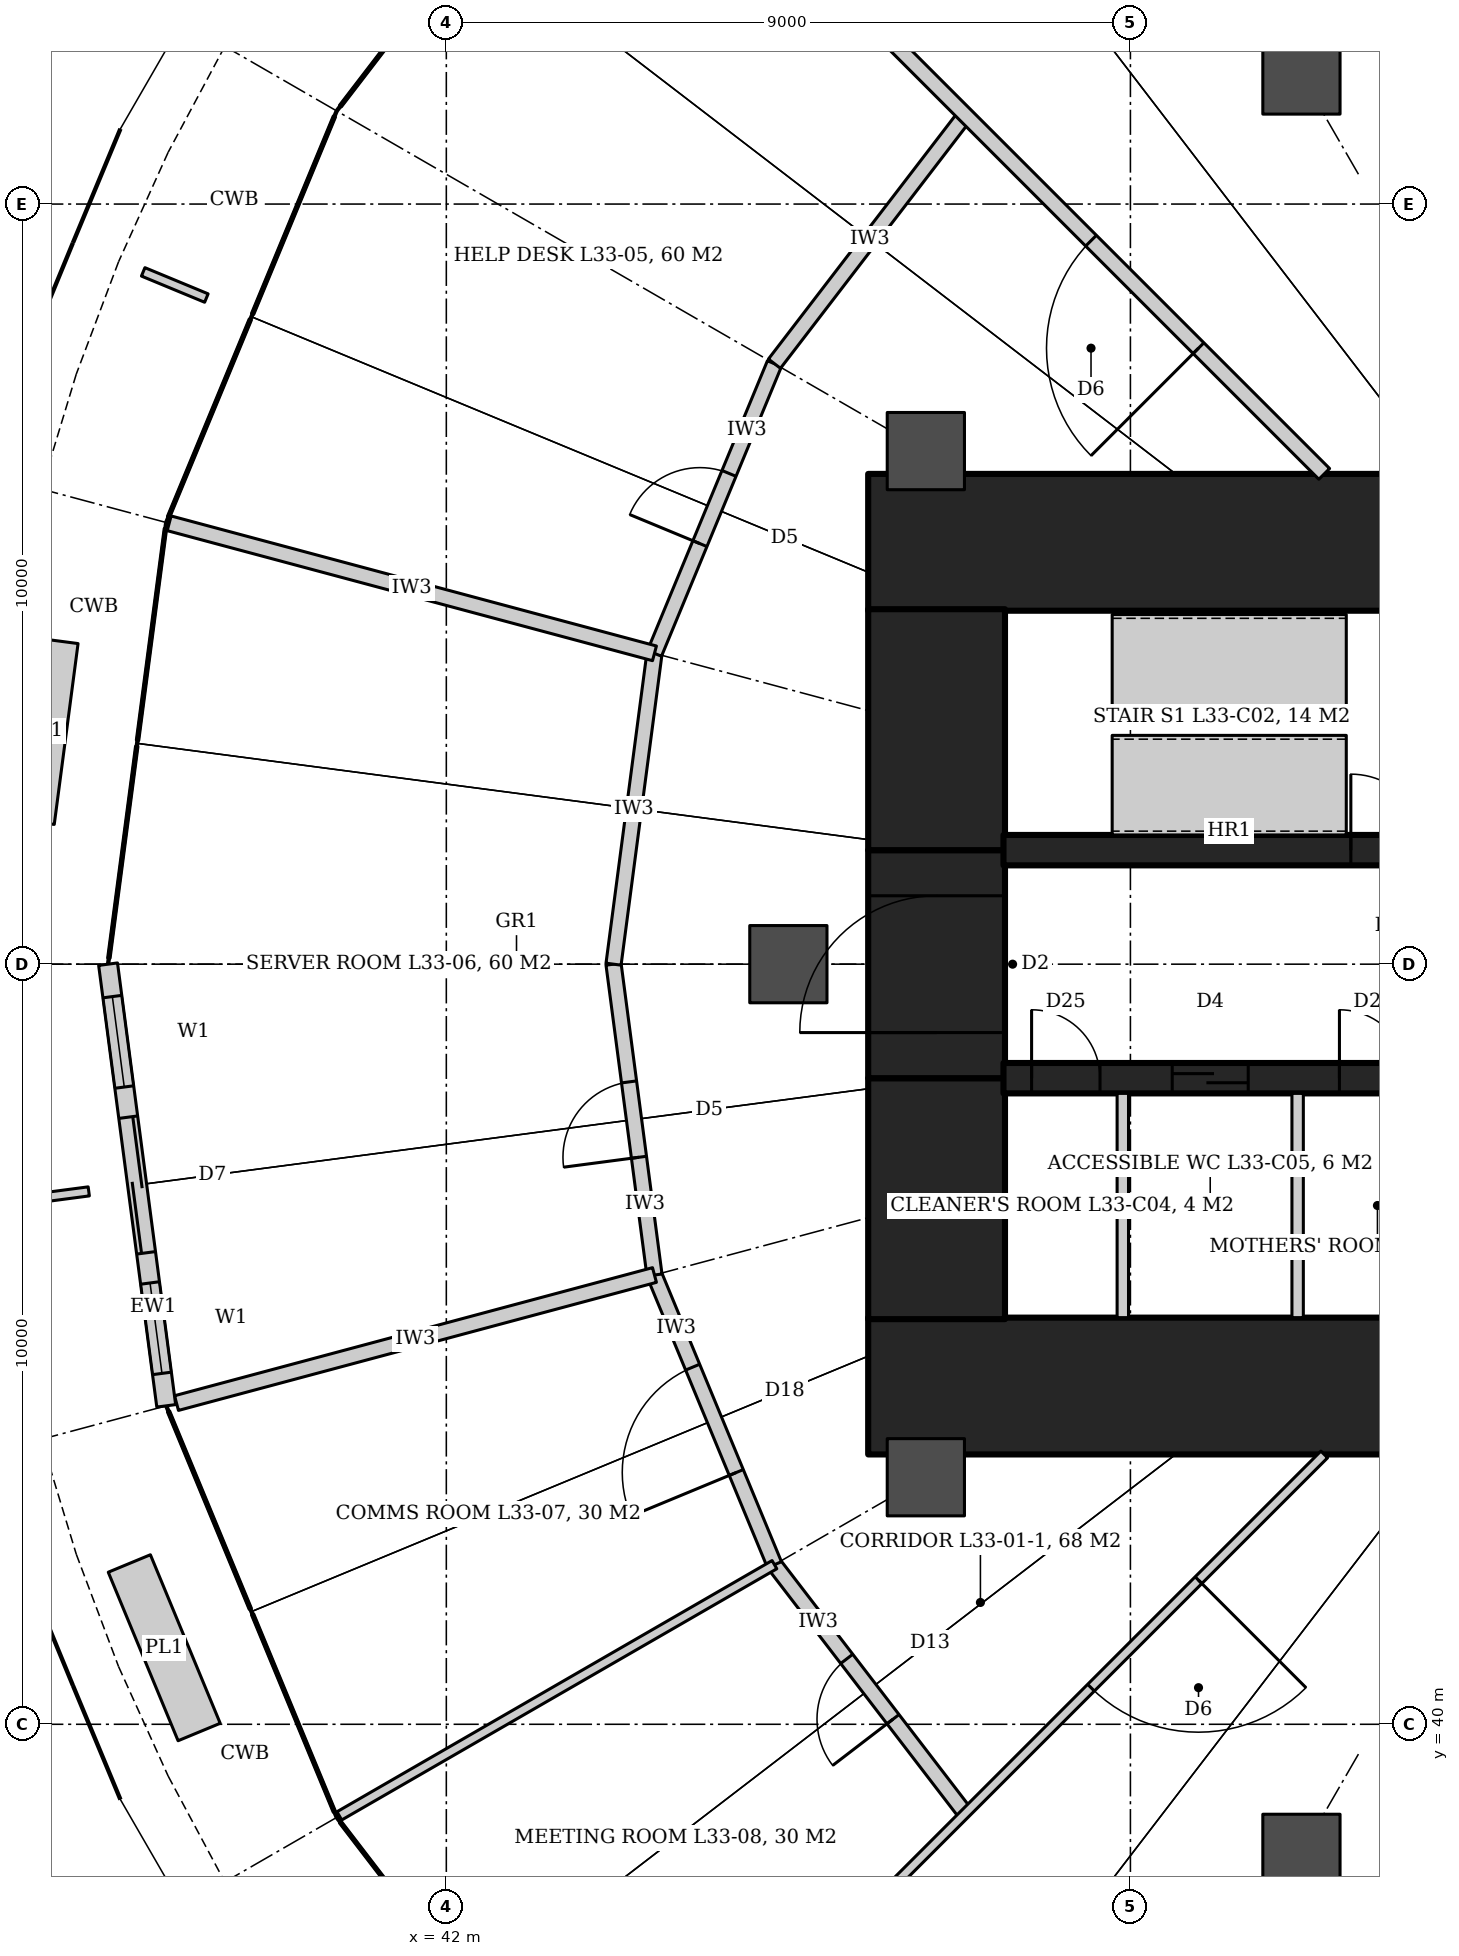
"""IFC4 building model, lengths in metres.
Left out: names, types, materials, properties, quantities, classifications, styles, units other than length and angle.
Written with IfcOpenShell. Run it as: python <this file> out.ifc"""

import sys

from ifc_helpers import new_model, si_unit, direction, frame, frame_2d, origin, origin_2d, place, context, subcontext, project, spatial, rectangle, hollow_circle, extrude, element, fill, save


model = new_model("IFC4")
c1 = context("Model", 3, precision=1e-05, world=origin(), true_north=direction((0.0, 1.0)))
c2 = subcontext(c1, "Body", "Model", "MODEL_VIEW")
j1 = project(units=[si_unit("LENGTHUNIT", "METRE"), si_unit("PLANEANGLEUNIT", "RADIAN")], contexts=[c1])
p1 = place(None, origin())
s1 = spatial("IfcSite", under=j1, at=p1, CompositionType="ELEMENT")
p2 = place(p1, origin())
s2 = spatial("IfcBuilding", under=s1, at=p2, CompositionType="ELEMENT")
p3 = place(p2, frame((0.0, 0.0, 147.8)))
s3 = spatial("IfcBuildingStorey", under=s2, at=p3, CompositionType="ELEMENT", Elevation=147.8)
for number, where, z_axis, x_axis in (
    (1, (47.55, 55.55, 0.0), (0.0, 0.0, 1.0), (1.0, 0.0, 0.0)),
    (2, (47.55, 44.45, 0.0), (0.0, 0.0, 1.0), (1.0, 0.0, 0.0)),
):
    element("IfcWall", number, at=place(p3, frame(where, z_axis=z_axis, x_axis=x_axis)), inside=s3, PredefinedType="SHEAR", context=c2, shape_type="SweptSolid", body=[
        extrude(rectangle(XDim=7.85, YDim=1.8, at=frame_2d((3.925, 0.0))), origin(), (0.0, 0.0, 1.0), 4.2),
    ])
p4 = place(p3, frame((48.45, 45.33, 0.0), z_axis=(0.0, 0.0, 1.0), x_axis=(0.0, 1.0, 0.0)))
e3 = element("IfcWall", 3, at=p4, inside=s3, PredefinedType="SHEAR", context=c2, shape_type="SweptSolid", body=[
    extrude(rectangle(XDim=3.17, YDim=1.8, at=frame_2d((1.585, 0.0))), origin(), (0.0, 0.0, 1.0), 4.2),
])
p5 = place(p3, frame((48.45, 48.5, 0.0), z_axis=(0.0, 0.0, 1.0), x_axis=(0.0, 1.0, 0.0)))
e4 = element("IfcWall", 4, at=p5, inside=s3, PredefinedType="SHEAR", context=c2, shape_type="SweptSolid", body=[
    extrude(rectangle(XDim=3.0, YDim=1.8, at=frame_2d((1.5, 0.0))), origin(), (0.0, 0.0, 1.0), 4.2),
])
p6 = place(p5, frame((0.6, 0.0, 0.0)))
e5 = element("IfcOpeningElement", 5, at=p6, cuts=e4, PredefinedType="OPENING", context=c2, shape_type="SweptSolid", body=[
    extrude(rectangle(XDim=1.8, YDim=2.1, at=frame_2d((0.9, 1.05))), frame((0.0, 0.91, 0.0), z_axis=(0.0, -1.0, 0.0), x_axis=(1.0, 0.0, 0.0)), (0.0, 0.0, 1.0), 1.82),
])
p7 = place(p3, frame((48.45, 51.5, 0.0), z_axis=(0.0, 0.0, 1.0), x_axis=(0.0, 1.0, 0.0)))
e6 = element("IfcWall", 6, at=p7, inside=s3, PredefinedType="SHEAR", context=c2, shape_type="SweptSolid", body=[
    extrude(rectangle(XDim=3.17, YDim=1.8, at=frame_2d((1.585, 0.0))), origin(), (0.0, 0.0, 1.0), 4.2),
])
p8 = place(p3, frame((49.33, 51.5, 0.0), z_axis=(0.0, 0.0, 1.0), x_axis=(1.0, 0.0, 0.0)))
e7 = element("IfcWall", 7, at=p8, inside=s3, PredefinedType="SHEAR", context=c2, shape_type="SweptSolid", body=[
    extrude(rectangle(XDim=6.07, YDim=0.4, at=frame_2d((3.035, 0.0))), origin(), (0.0, 0.0, 1.0), 4.2),
])
p9 = place(p8, frame((4.57, 0.0, 0.0)))
e8 = element("IfcOpeningElement", 8, at=p9, cuts=e7, PredefinedType="OPENING", context=c2, shape_type="SweptSolid", body=[
    extrude(rectangle(XDim=1.0, YDim=2.1, at=frame_2d((0.5, 1.05))), frame((0.0, 0.21, 0.0), z_axis=(0.0, -1.0, 0.0), x_axis=(1.0, 0.0, 0.0)), (0.0, 0.0, 1.0), 0.42),
])
p10 = place(p3, frame((49.33, 48.5, 0.0), z_axis=(0.0, 0.0, 1.0), x_axis=(1.0, 0.0, 0.0)))
e9 = element("IfcWall", 9, at=p10, inside=s3, PredefinedType="SHEAR", context=c2, shape_type="SweptSolid", body=[
    extrude(rectangle(XDim=6.07, YDim=0.4, at=frame_2d((3.035, 0.0))), origin(), (0.0, 0.0, 1.0), 4.2),
])
p11 = place(p10, frame((0.37, 0.0, 0.0)))
e10 = element("IfcOpeningElement", 10, at=p11, cuts=e9, PredefinedType="OPENING", context=c2, shape_type="SweptSolid", body=[
    extrude(rectangle(XDim=0.9, YDim=2.1, at=frame_2d((0.45, 1.05))), frame((0.0, 0.21, 0.0), z_axis=(0.0, -1.0, 0.0), x_axis=(1.0, 0.0, 0.0)), (0.0, 0.0, 1.0), 0.42),
])
p12 = place(p10, frame((2.22, 0.0, 0.0)))
e11 = element("IfcOpeningElement", 11, at=p12, cuts=e9, PredefinedType="OPENING", context=c2, shape_type="SweptSolid", body=[
    extrude(rectangle(XDim=1.0, YDim=2.1, at=frame_2d((0.5, 1.05))), frame((0.0, 0.21, 0.0), z_axis=(0.0, -1.0, 0.0), x_axis=(1.0, 0.0, 0.0)), (0.0, 0.0, 1.0), 0.42),
])
p13 = place(p10, frame((4.42, 0.0, 0.0)))
e12 = element("IfcOpeningElement", 12, at=p13, cuts=e9, PredefinedType="OPENING", context=c2, shape_type="SweptSolid", body=[
    extrude(rectangle(XDim=0.9, YDim=2.1, at=frame_2d((0.45, 1.05))), frame((0.0, 0.21, 0.0), z_axis=(0.0, -1.0, 0.0), x_axis=(1.0, 0.0, 0.0)), (0.0, 0.0, 1.0), 0.42),
])
for number, where, z_axis, x_axis in (
    (13, (53.25, 61.691, 0.0), (0.0, 0.0, 1.0), (1.0, 0.0, 0.0)),
    (14, (48.309, 56.75, 0.0), (0.0, 0.0, 1.0), (1.0, 0.0, 0.0)),
    (15, (46.5, 50.0, 0.0), (0.0, 0.0, 1.0), (1.0, 0.0, 0.0)),
    (16, (48.309, 43.25, 0.0), (0.0, 0.0, 1.0), (1.0, 0.0, 0.0)),
    (17, (53.25, 38.309, 0.0), (0.0, 0.0, 1.0), (1.0, 0.0, 0.0)),
):
    element("IfcColumn", number, at=place(p3, frame(where, z_axis=z_axis, x_axis=x_axis)), inside=s3, PredefinedType="COLUMN", context=c2, shape_type="SweptSolid", body=[
        extrude(hollow_circle(Radius=0.508, WallThickness=0.05, at=origin_2d()), origin(), (0.0, 0.0, 1.0), 4.2),
    ])
p14 = place(p3, frame((48.828, 38.828, 0.0), z_axis=(0.0, 0.0, 1.0), x_axis=(-0.608714823874, 0.793389099494, 0.0)))
e18 = element("IfcWall", 18, at=p14, inside=s3, PredefinedType="PARTITIONING", context=c2, shape_type="SweptSolid", body=[
    extrude(rectangle(XDim=4.125, YDim=0.2, at=frame_2d((2.062, 0.0))), origin(), (0.0, 0.0, 1.0), 3.04),
])
p15 = place(p14, frame((1.562, 0.0, 0.0)))
e19 = element("IfcOpeningElement", 19, at=p15, cuts=e18, PredefinedType="OPENING", context=c2, shape_type="SweptSolid", body=[
    extrude(rectangle(XDim=1.0, YDim=2.4, at=frame_2d((0.5, 1.2))), frame((0.0, 0.11, 0.0), z_axis=(0.0, -1.0, 0.0), x_axis=(1.0, 0.0, 0.0)), (0.0, 0.0, 1.0), 0.22),
])
p16 = place(p3, frame((46.317, 42.1, 0.0), z_axis=(0.0, 0.0, 1.0), x_axis=(-0.382731667114, 0.923859551549, 0.0)))
e20 = element("IfcWall", 20, at=p16, inside=s3, PredefinedType="PARTITIONING", context=c2, shape_type="SweptSolid", body=[
    extrude(rectangle(XDim=4.125, YDim=0.2, at=frame_2d((2.062, 0.0))), origin(), (0.0, 0.0, 1.0), 3.04),
])
p17 = place(p16, frame((1.312, 0.0, 0.0)))
e21 = element("IfcOpeningElement", 21, at=p17, cuts=e20, PredefinedType="OPENING", context=c2, shape_type="SweptSolid", body=[
    extrude(rectangle(XDim=1.5, YDim=2.1, at=frame_2d((0.75, 1.05))), frame((0.0, 0.11, 0.0), z_axis=(0.0, -1.0, 0.0), x_axis=(1.0, 0.0, 0.0)), (0.0, 0.0, 1.0), 0.22),
])
p18 = place(p3, frame((44.738, 45.911, 0.0), z_axis=(0.0, 0.0, 1.0), x_axis=(-0.130515758099, 0.991446234996, 0.0)))
e22 = element("IfcWall", 22, at=p18, inside=s3, PredefinedType="PARTITIONING", context=c2, shape_type="SweptSolid", body=[
    extrude(rectangle(XDim=4.125, YDim=0.2, at=frame_2d((2.062, 0.0))), origin(), (0.0, 0.0, 1.0), 3.04),
])
p19 = place(p18, frame((1.562, 0.0, 0.0)))
e23 = element("IfcOpeningElement", 23, at=p19, cuts=e22, PredefinedType="OPENING", context=c2, shape_type="SweptSolid", body=[
    extrude(rectangle(XDim=1.0, YDim=2.1, at=frame_2d((0.5, 1.05))), frame((0.0, 0.11, 0.0), z_axis=(0.0, -1.0, 0.0), x_axis=(1.0, 0.0, 0.0)), (0.0, 0.0, 1.0), 0.22),
])
p20 = place(p3, frame((44.2, 50.0, 0.0), z_axis=(0.0, 0.0, 1.0), x_axis=(0.130515758099, 0.991446234996, 0.0)))
e24 = element("IfcWall", 24, at=p20, inside=s3, PredefinedType="PARTITIONING", context=c2, shape_type="SweptSolid", body=[
    extrude(rectangle(XDim=4.125, YDim=0.2, at=frame_2d((2.062, 0.0))), origin(), (0.0, 0.0, 1.0), 3.04),
])
p21 = place(p3, frame((44.738, 54.089, 0.0), z_axis=(0.0, 0.0, 1.0), x_axis=(0.382731667114, 0.923859551549, 0.0)))
e25 = element("IfcWall", 25, at=p21, inside=s3, PredefinedType="PARTITIONING", context=c2, shape_type="SweptSolid", body=[
    extrude(rectangle(XDim=4.125, YDim=0.2, at=frame_2d((2.062, 0.0))), origin(), (0.0, 0.0, 1.0), 3.04),
])
p22 = place(p21, frame((1.562, 0.0, 0.0)))
e26 = element("IfcOpeningElement", 26, at=p22, cuts=e25, PredefinedType="OPENING", context=c2, shape_type="SweptSolid", body=[
    extrude(rectangle(XDim=1.0, YDim=2.1, at=frame_2d((0.5, 1.05))), frame((0.0, 0.11, 0.0), z_axis=(0.0, -1.0, 0.0), x_axis=(1.0, 0.0, 0.0)), (0.0, 0.0, 1.0), 0.22),
])
p23 = place(p3, frame((46.317, 57.9, 0.0), z_axis=(0.0, 0.0, 1.0), x_axis=(0.608714823874, 0.793389099494, 0.0)))
e27 = element("IfcWall", 27, at=p23, inside=s3, PredefinedType="PARTITIONING", context=c2, shape_type="SweptSolid", body=[
    extrude(rectangle(XDim=4.125, YDim=0.2, at=frame_2d((2.062, 0.0))), origin(), (0.0, 0.0, 1.0), 3.04),
])
p24 = place(p3, frame((53.55, 56.45, 0.0), z_axis=(0.0, 0.0, 1.0), x_axis=(-0.707106781187, 0.707106781187, 0.0)))
e28 = element("IfcWall", 28, at=p24, inside=s3, PredefinedType="PARTITIONING", context=c2, shape_type="SweptSolid", body=[
    extrude(rectangle(XDim=13.288, YDim=0.2, at=frame_2d((6.644, 0.0))), origin(), (0.0, 0.0, 1.0), 3.02),
])
p25 = place(p24, frame((2.339, 0.0, 0.0)))
e29 = element("IfcOpeningElement", 29, at=p25, cuts=e28, PredefinedType="OPENING", context=c2, shape_type="SweptSolid", body=[
    extrude(rectangle(XDim=2.0, YDim=2.1, at=frame_2d((1.0, 1.05))), frame((0.0, 0.11, 0.0), z_axis=(0.0, -1.0, 0.0), x_axis=(1.0, 0.0, 0.0)), (0.0, 0.0, 1.0), 0.22),
])
p26 = place(p3, frame((44.738, 54.089, 0.0), z_axis=(0.0, 0.0, 1.0), x_axis=(-0.965929586934, 0.258805009775, 0.0)))
e30 = element("IfcWall", 30, at=p26, inside=s3, PredefinedType="PARTITIONING", context=c2, shape_type="SweptSolid", body=[
    extrude(rectangle(XDim=6.61, YDim=0.2, at=frame_2d((3.305, 0.0))), origin(), (0.0, 0.0, 1.0), 3.04),
])
p27 = place(p3, frame((44.738, 45.911, 0.0), z_axis=(0.0, 0.0, 1.0), x_axis=(-0.965919257384, -0.258843559344, 0.0)))
e31 = element("IfcWall", 31, at=p27, inside=s3, PredefinedType="PARTITIONING", context=c2, shape_type="SweptSolid", body=[
    extrude(rectangle(XDim=6.51, YDim=0.2, at=frame_2d((3.255, 0.0))), origin(), (0.0, 0.0, 1.0), 3.04),
])
p28 = place(p3, frame((46.317, 42.1, 0.0), z_axis=(0.0, 0.0, 1.0), x_axis=(-0.866020751647, -0.500008057651, 0.0)))
e32 = element("IfcWall", 32, at=p28, inside=s3, PredefinedType="PARTITIONING", context=c2, shape_type="SweptSolid", body=[
    extrude(rectangle(XDim=6.61, YDim=0.125, at=frame_2d((3.305, 0.0))), origin(), (0.0, 0.0, 1.0), 3.04),
])
p29 = place(p3, frame((53.55, 43.55, 0.0), z_axis=(0.0, 0.0, 1.0), x_axis=(-0.707106781187, -0.707106781187, 0.0)))
e33 = element("IfcWall", 33, at=p29, inside=s3, PredefinedType="PARTITIONING", context=c2, shape_type="SweptSolid", body=[
    extrude(rectangle(XDim=13.288, YDim=0.125, at=frame_2d((6.644, 0.0))), origin(), (0.0, 0.0, 1.0), 3.02),
])
p30 = place(p29, frame((2.339, 0.0, 0.0)))
e34 = element("IfcOpeningElement", 34, at=p30, cuts=e33, PredefinedType="OPENING", context=c2, shape_type="SweptSolid", body=[
    extrude(rectangle(XDim=2.0, YDim=2.1, at=frame_2d((1.0, 1.05))), frame((0.0, 0.073, 0.0), z_axis=(0.0, -1.0, 0.0), x_axis=(1.0, 0.0, 0.0)), (0.0, 0.0, 1.0), 0.145),
])
p31 = place(p3, frame((37.55, 50.0, 0.0), z_axis=(0.0, 0.0, 1.0), x_axis=(0.130512702292, -0.991446637263, 0.0)))
e35 = element("IfcWall", 35, at=p31, inside=s3, PredefinedType="SOLIDWALL", context=c2, shape_type="SweptSolid", body=[
    extrude(rectangle(XDim=5.861, YDim=0.25, at=frame_2d((2.93, 0.0))), origin(), (0.0, 0.0, 1.0), 4.04),
])
p32 = place(p31, frame((2.03, 0.0, 0.0)))
e36 = element("IfcOpeningElement", 36, at=p32, cuts=e35, PredefinedType="OPENING", context=c2, shape_type="SweptSolid", body=[
    extrude(rectangle(XDim=1.8, YDim=2.4, at=frame_2d((0.9, 1.2))), frame((0.0, 0.135, 0.0), z_axis=(0.0, -1.0, 0.0), x_axis=(1.0, 0.0, 0.0)), (0.0, 0.0, 1.0), 0.27),
])
p33 = place(p31, frame((0.43, 0.0, 0.0)))
e37 = element("IfcOpeningElement", 37, at=p33, cuts=e35, PredefinedType="OPENING", context=c2, shape_type="SweptSolid", body=[
    extrude(rectangle(XDim=1.2, YDim=2.4, at=frame_2d((0.6, 1.2))), frame((0.0, 0.135, 0.0), z_axis=(0.0, -1.0, 0.0), x_axis=(1.0, 0.0, 0.0)), (0.0, 0.0, 1.0), 0.27),
])
p34 = place(p31, frame((4.23, 0.0, 0.0)))
e38 = element("IfcOpeningElement", 38, at=p34, cuts=e35, PredefinedType="OPENING", context=c2, shape_type="SweptSolid", body=[
    extrude(rectangle(XDim=1.2, YDim=2.4, at=frame_2d((0.6, 1.2))), frame((0.0, 0.135, 0.0), z_axis=(0.0, -1.0, 0.0), x_axis=(1.0, 0.0, 0.0)), (0.0, 0.0, 1.0), 0.27),
])
for number, where, z_axis, x_axis in (
    (39, (50.9, 45.35, 0.0), (0.0, 0.0, 1.0), (0.0, 1.0, 0.0)),
    (40, (53.2, 45.35, 0.0), (0.0, 0.0, 1.0), (0.0, 1.0, 0.0)),
):
    element("IfcWall", number, at=place(p3, frame(where, z_axis=z_axis, x_axis=x_axis)), inside=s3, PredefinedType="PARTITIONING", context=c2, shape_type="SweptSolid", body=[
        extrude(rectangle(XDim=2.95, YDim=0.15, at=frame_2d((1.475, 0.0))), origin(), (0.0, 0.0, 1.0), 4.04),
    ])
p35 = place(p25, origin())
e41 = element("IfcDoor", 41, at=p35, inside=s3, OperationType="DOUBLE_DOOR_DOUBLE_SWING", PredefinedType="DOOR", context=c2, shape_type="SweptSolid", body=[
    extrude(rectangle(XDim=2.0, YDim=2.1, at=frame_2d((1.0, 1.05))), frame((0.0, 0.025, 0.0), z_axis=(0.0, -1.0, 0.0), x_axis=(1.0, 0.0, 0.0)), (0.0, 0.0, 1.0), 0.05),
])
fill(e29, e41)
p36 = place(p22, origin())
e42 = element("IfcDoor", 42, at=p36, inside=s3, OperationType="SINGLE_SWING_LEFT", PredefinedType="DOOR", context=c2, shape_type="SweptSolid", body=[
    extrude(rectangle(XDim=1.0, YDim=2.1, at=frame_2d((0.5, 1.05))), frame((0.0, 0.025, 0.0), z_axis=(0.0, -1.0, 0.0), x_axis=(1.0, 0.0, 0.0)), (0.0, 0.0, 1.0), 0.05),
])
fill(e26, e42)
p37 = place(p19, origin())
e43 = element("IfcDoor", 43, at=p37, inside=s3, OperationType="SINGLE_SWING_LEFT", PredefinedType="DOOR", context=c2, shape_type="SweptSolid", body=[
    extrude(rectangle(XDim=1.0, YDim=2.1, at=frame_2d((0.5, 1.05))), frame((0.0, 0.025, 0.0), z_axis=(0.0, -1.0, 0.0), x_axis=(1.0, 0.0, 0.0)), (0.0, 0.0, 1.0), 0.05),
])
fill(e23, e43)
p38 = place(p17, origin())
e44 = element("IfcDoor", 44, at=p38, inside=s3, OperationType="DOUBLE_DOOR_DOUBLE_SWING", PredefinedType="DOOR", context=c2, shape_type="SweptSolid", body=[
    extrude(rectangle(XDim=1.5, YDim=2.1, at=frame_2d((0.75, 1.05))), frame((0.0, 0.025, 0.0), z_axis=(0.0, -1.0, 0.0), x_axis=(1.0, 0.0, 0.0)), (0.0, 0.0, 1.0), 0.05),
])
fill(e21, e44)
p39 = place(p15, origin())
e45 = element("IfcDoor", 45, at=p39, inside=s3, OperationType="SINGLE_SWING_LEFT", PredefinedType="DOOR", context=c2, shape_type="SweptSolid", body=[
    extrude(rectangle(XDim=1.0, YDim=2.4, at=frame_2d((0.5, 1.2))), frame((0.0, 0.025, 0.0), z_axis=(0.0, -1.0, 0.0), x_axis=(1.0, 0.0, 0.0)), (0.0, 0.0, 1.0), 0.05),
])
fill(e19, e45)
p40 = place(p30, origin())
e46 = element("IfcDoor", 46, at=p40, inside=s3, OperationType="DOUBLE_DOOR_DOUBLE_SWING", PredefinedType="DOOR", context=c2, shape_type="SweptSolid", body=[
    extrude(rectangle(XDim=2.0, YDim=2.1, at=frame_2d((1.0, 1.05))), frame((0.0, 0.025, 0.0), z_axis=(0.0, -1.0, 0.0), x_axis=(1.0, 0.0, 0.0)), (0.0, 0.0, 1.0), 0.05),
])
fill(e34, e46)
p41 = place(p32, origin())
e47 = element("IfcDoor", 47, at=p41, inside=s3, OperationType="DOUBLE_DOOR_SLIDING", PredefinedType="DOOR", context=c2, shape_type="SweptSolid", body=[
    extrude(rectangle(XDim=1.8, YDim=2.4, at=frame_2d((0.9, 1.2))), frame((0.0, 0.025, 0.0), z_axis=(0.0, -1.0, 0.0), x_axis=(1.0, 0.0, 0.0)), (0.0, 0.0, 1.0), 0.05),
])
fill(e36, e47)
p42 = place(p33, origin())
e48 = element("IfcWindow", 48, at=p42, inside=s3, PartitioningType="SINGLE_PANEL", PredefinedType="WINDOW", context=c2, shape_type="SweptSolid", body=[
    extrude(rectangle(XDim=1.2, YDim=2.4, at=frame_2d((0.6, 1.2))), frame((0.0, 0.03, 0.0), z_axis=(0.0, -1.0, 0.0), x_axis=(1.0, 0.0, 0.0)), (0.0, 0.0, 1.0), 0.06),
])
fill(e37, e48)
p43 = place(p34, origin())
e49 = element("IfcWindow", 49, at=p43, inside=s3, PartitioningType="SINGLE_PANEL", PredefinedType="WINDOW", context=c2, shape_type="SweptSolid", body=[
    extrude(rectangle(XDim=1.2, YDim=2.4, at=frame_2d((0.6, 1.2))), frame((0.0, 0.03, 0.0), z_axis=(0.0, -1.0, 0.0), x_axis=(1.0, 0.0, 0.0)), (0.0, 0.0, 1.0), 0.06),
])
fill(e38, e49)
p44 = place(p9, origin())
e50 = element("IfcDoor", 50, at=p44, inside=s3, OperationType="SINGLE_SWING_LEFT", PredefinedType="DOOR", context=c2, shape_type="SweptSolid", body=[
    extrude(rectangle(XDim=1.0, YDim=2.1, at=frame_2d((0.5, 1.05))), frame((0.0, 0.025, 0.0), z_axis=(0.0, -1.0, 0.0), x_axis=(1.0, 0.0, 0.0)), (0.0, 0.0, 1.0), 0.05),
])
fill(e8, e50)
p45 = place(p11, origin())
e51 = element("IfcDoor", 51, at=p45, inside=s3, OperationType="SINGLE_SWING_RIGHT", PredefinedType="DOOR", context=c2, shape_type="SweptSolid", body=[
    extrude(rectangle(XDim=0.9, YDim=2.1, at=frame_2d((0.45, 1.05))), frame((0.0, 0.025, 0.0), z_axis=(0.0, -1.0, 0.0), x_axis=(1.0, 0.0, 0.0)), (0.0, 0.0, 1.0), 0.05),
])
fill(e10, e51)
p46 = place(p12, origin())
e52 = element("IfcDoor", 52, at=p46, inside=s3, OperationType="SLIDING_TO_LEFT", PredefinedType="DOOR", context=c2, shape_type="SweptSolid", body=[
    extrude(rectangle(XDim=1.0, YDim=2.1, at=frame_2d((0.5, 1.05))), frame((0.0, 0.025, 0.0), z_axis=(0.0, -1.0, 0.0), x_axis=(1.0, 0.0, 0.0)), (0.0, 0.0, 1.0), 0.05),
])
fill(e11, e52)
p47 = place(p13, origin())
e53 = element("IfcDoor", 53, at=p47, inside=s3, OperationType="SINGLE_SWING_RIGHT", PredefinedType="DOOR", context=c2, shape_type="SweptSolid", body=[
    extrude(rectangle(XDim=0.9, YDim=2.1, at=frame_2d((0.45, 1.05))), frame((0.0, 0.025, 0.0), z_axis=(0.0, -1.0, 0.0), x_axis=(1.0, 0.0, 0.0)), (0.0, 0.0, 1.0), 0.05),
])
fill(e12, e53)
p48 = place(p6, origin())
e54 = element("IfcDoor", 54, at=p48, inside=s3, OperationType="DOUBLE_DOOR_DOUBLE_SWING", PredefinedType="DOOR", context=c2, shape_type="SweptSolid", body=[
    extrude(rectangle(XDim=1.8, YDim=2.1, at=frame_2d((0.9, 1.05))), frame((0.0, 0.025, 0.0), z_axis=(0.0, -1.0, 0.0), x_axis=(1.0, 0.0, 0.0)), (0.0, 0.0, 1.0), 0.05),
])
fill(e5, e54)
save(model, sys.argv[1])
